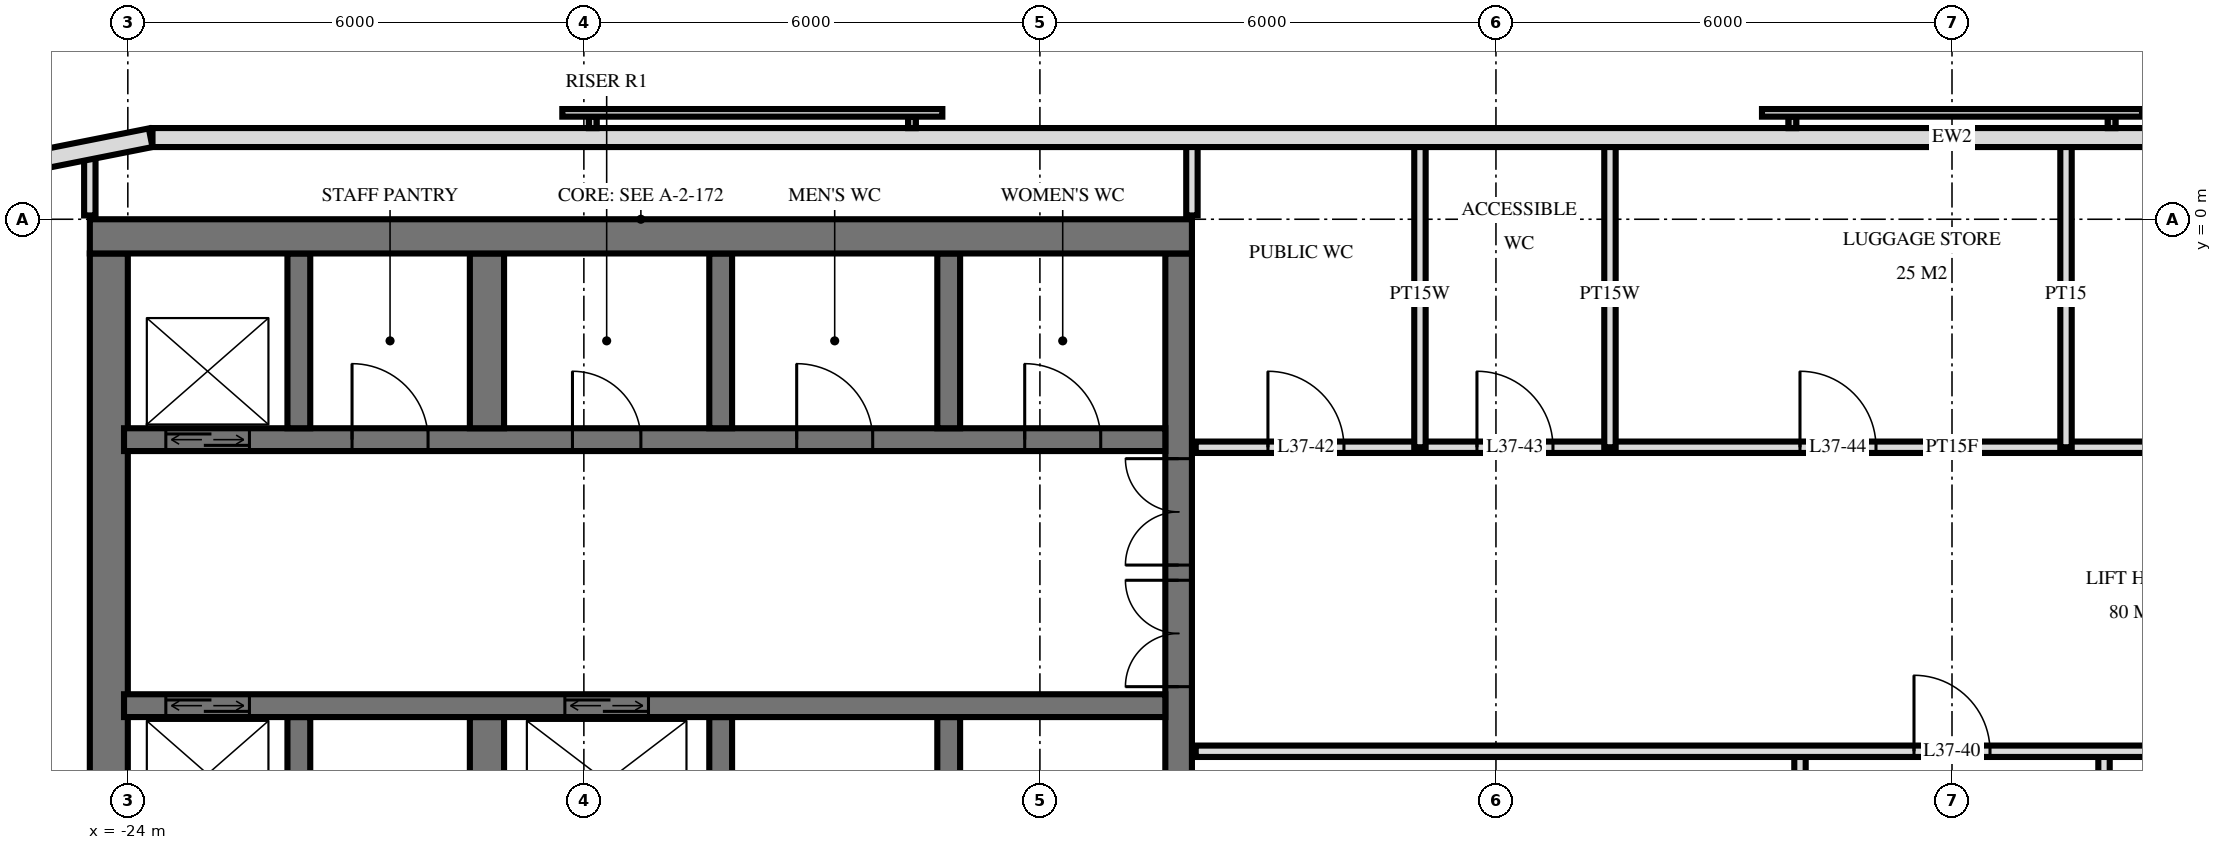
"""IFC4 building model, lengths in metres.
Left out: names, types, materials, properties, quantities, classifications, styles, units other than length and angle.
Written with IfcOpenShell. Run it as: python <this file> out.ifc"""

import sys

from ifc_helpers import new_model, si_unit, direction, frame, frame_2d, origin, place, context, subcontext, project, spatial, rectangle, extrude, element, fill, save


model = new_model("IFC4")
c1 = context("Model", 3, precision=1e-05, world=origin(), true_north=direction((0.0, 1.0)))
c2 = subcontext(c1, "Body", "Model", "MODEL_VIEW")
j1 = project(units=[si_unit("LENGTHUNIT", "METRE"), si_unit("PLANEANGLEUNIT", "RADIAN")], contexts=[c1])
p1 = place(None, origin())
s1 = spatial("IfcSite", under=j1, at=p1, CompositionType="ELEMENT")
p2 = place(p1, origin())
s2 = spatial("IfcBuilding", under=s1, at=p2, CompositionType="ELEMENT")
p3 = place(p2, frame((0.0, 0.0, 145.2)))
s3 = spatial("IfcBuildingStorey", under=s2, at=p3, CompositionType="ELEMENT", Elevation=145.2)
p4 = place(p3, frame((-24.5, -0.225, 0.0), z_axis=(0.0, 0.0, 1.0), x_axis=(1.0, 0.0, 0.0)))
e1 = element("IfcWall", 1, at=p4, inside=s3, PredefinedType="SHEAR", context=c2, shape_type="SweptSolid", body=[
    extrude(rectangle(XDim=14.5, YDim=0.45, at=frame_2d((7.25, 0.0))), origin(), (0.0, 0.0, 1.0), 3.6),
])
p5 = place(p3, frame((-10.175, -14.55, 0.0), z_axis=(0.0, 0.0, 1.0), x_axis=(0.0, 1.0, 0.0)))
e2 = element("IfcWall", 2, at=p5, inside=s3, PredefinedType="SHEAR", context=c2, shape_type="SweptSolid", body=[
    extrude(rectangle(XDim=14.1, YDim=0.35, at=frame_2d((7.05, 0.0))), origin(), (0.0, 0.0, 1.0), 3.6),
])
p6 = place(p5, frame((8.4, 0.0, 0.0)))
e3 = element("IfcOpeningElement", 3, at=p6, cuts=e2, PredefinedType="OPENING", context=c2, shape_type="SweptSolid", body=[
    extrude(rectangle(XDim=1.4, YDim=2.4, at=frame_2d((0.7, 1.2))), frame((0.0, 0.185, 0.0), z_axis=(0.0, -1.0, 0.0), x_axis=(1.0, 0.0, 0.0)), (0.0, 0.0, 1.0), 0.37),
])
p7 = place(p5, frame((10.0, 0.0, 0.0)))
e4 = element("IfcOpeningElement", 4, at=p7, cuts=e2, PredefinedType="OPENING", context=c2, shape_type="SweptSolid", body=[
    extrude(rectangle(XDim=1.4, YDim=2.4, at=frame_2d((0.7, 1.2))), frame((0.0, 0.185, 0.0), z_axis=(0.0, -1.0, 0.0), x_axis=(1.0, 0.0, 0.0)), (0.0, 0.0, 1.0), 0.37),
])
p8 = place(p5, frame((4.0, 0.0, 0.0)))
e5 = element("IfcOpeningElement", 5, at=p8, cuts=e2, PredefinedType="OPENING", context=c2, shape_type="SweptSolid", body=[
    extrude(rectangle(XDim=1.2, YDim=2.1, at=frame_2d((0.6, 1.05))), frame((0.0, 0.185, 0.0), z_axis=(0.0, -1.0, 0.0), x_axis=(1.0, 0.0, 0.0)), (0.0, 0.0, 1.0), 0.37),
])
p9 = place(p3, frame((-24.25, -14.55, 0.0), z_axis=(0.0, 0.0, 1.0), x_axis=(0.0, 1.0, 0.0)))
e6 = element("IfcWall", 6, at=p9, inside=s3, PredefinedType="SHEAR", context=c2, shape_type="SweptSolid", body=[
    extrude(rectangle(XDim=14.1, YDim=0.5, at=frame_2d((7.05, 0.0))), origin(), (0.0, 0.0, 1.0), 3.6),
])
p10 = place(p3, frame((-24.05, -2.9, 0.0), z_axis=(0.0, 0.0, 1.0), x_axis=(1.0, 0.0, 0.0)))
e7 = element("IfcWall", 7, at=p10, inside=s3, PredefinedType="SHEAR", context=c2, shape_type="SweptSolid", body=[
    extrude(rectangle(XDim=13.7, YDim=0.3, at=frame_2d((6.85, 0.0))), origin(), (0.0, 0.0, 1.0), 3.6),
])
p11 = place(p10, frame((0.55, 0.0, 0.0)))
e8 = element("IfcOpeningElement", 8, at=p11, cuts=e7, PredefinedType="OPENING", context=c2, shape_type="SweptSolid", body=[
    extrude(rectangle(XDim=1.1, YDim=2.1, at=frame_2d((0.55, 1.05))), frame((0.0, 0.16, 0.0), z_axis=(0.0, -1.0, 0.0), x_axis=(1.0, 0.0, 0.0)), (0.0, 0.0, 1.0), 0.32),
])
p12 = place(p10, frame((5.9, 0.0, 0.0)))
e9 = element("IfcOpeningElement", 9, at=p12, cuts=e7, PredefinedType="OPENING", context=c2, shape_type="SweptSolid", body=[
    extrude(rectangle(XDim=0.9, YDim=2.1, at=frame_2d((0.45, 1.05))), frame((0.0, 0.16, 0.0), z_axis=(0.0, -1.0, 0.0), x_axis=(1.0, 0.0, 0.0)), (0.0, 0.0, 1.0), 0.32),
])
p13 = place(p10, frame((11.85, 0.0, 0.0)))
e10 = element("IfcOpeningElement", 10, at=p13, cuts=e7, PredefinedType="OPENING", context=c2, shape_type="SweptSolid", body=[
    extrude(rectangle(XDim=1.0, YDim=2.1, at=frame_2d((0.5, 1.05))), frame((0.0, 0.16, 0.0), z_axis=(0.0, -1.0, 0.0), x_axis=(1.0, 0.0, 0.0)), (0.0, 0.0, 1.0), 0.32),
])
p14 = place(p10, frame((8.85, 0.0, 0.0)))
e11 = element("IfcOpeningElement", 11, at=p14, cuts=e7, PredefinedType="OPENING", context=c2, shape_type="SweptSolid", body=[
    extrude(rectangle(XDim=1.0, YDim=2.1, at=frame_2d((0.5, 1.05))), frame((0.0, 0.16, 0.0), z_axis=(0.0, -1.0, 0.0), x_axis=(1.0, 0.0, 0.0)), (0.0, 0.0, 1.0), 0.32),
])
p15 = place(p10, frame((3.0, 0.0, 0.0)))
e12 = element("IfcOpeningElement", 12, at=p15, cuts=e7, PredefinedType="OPENING", context=c2, shape_type="SweptSolid", body=[
    extrude(rectangle(XDim=1.0, YDim=2.1, at=frame_2d((0.5, 1.05))), frame((0.0, 0.16, 0.0), z_axis=(0.0, -1.0, 0.0), x_axis=(1.0, 0.0, 0.0)), (0.0, 0.0, 1.0), 0.32),
])
p16 = place(p3, frame((-24.05, -6.4, 0.0), z_axis=(0.0, 0.0, 1.0), x_axis=(1.0, 0.0, 0.0)))
e13 = element("IfcWall", 13, at=p16, inside=s3, PredefinedType="SHEAR", context=c2, shape_type="SweptSolid", body=[
    extrude(rectangle(XDim=13.7, YDim=0.3, at=frame_2d((6.85, 0.0))), origin(), (0.0, 0.0, 1.0), 3.6),
])
p17 = place(p16, frame((0.55, 0.0, 0.0)))
e14 = element("IfcOpeningElement", 14, at=p17, cuts=e13, PredefinedType="OPENING", context=c2, shape_type="SweptSolid", body=[
    extrude(rectangle(XDim=1.1, YDim=2.1, at=frame_2d((0.55, 1.05))), frame((0.0, 0.16, 0.0), z_axis=(0.0, -1.0, 0.0), x_axis=(1.0, 0.0, 0.0)), (0.0, 0.0, 1.0), 0.32),
])
p18 = place(p16, frame((5.8, 0.0, 0.0)))
e15 = element("IfcOpeningElement", 15, at=p18, cuts=e13, PredefinedType="OPENING", context=c2, shape_type="SweptSolid", body=[
    extrude(rectangle(XDim=1.1, YDim=2.1, at=frame_2d((0.55, 1.05))), frame((0.0, 0.16, 0.0), z_axis=(0.0, -1.0, 0.0), x_axis=(1.0, 0.0, 0.0)), (0.0, 0.0, 1.0), 0.32),
])
for number, where, z_axis, x_axis in (
    (16, (-13.2, -2.75, 0.0), (0.0, 0.0, 1.0), (0.0, 1.0, 0.0)),
    (17, (-13.2, -8.85, 0.0), (0.0, 0.0, 1.0), (0.0, 1.0, 0.0)),
    (18, (-16.2, -2.75, 0.0), (0.0, 0.0, 1.0), (0.0, 1.0, 0.0)),
    (19, (-16.2, -8.85, 0.0), (0.0, 0.0, 1.0), (0.0, 1.0, 0.0)),
):
    element("IfcWall", number, at=place(p3, frame(where, z_axis=z_axis, x_axis=x_axis)), inside=s3, PredefinedType="SHEAR", context=c2, shape_type="SweptSolid", body=[
        extrude(rectangle(XDim=2.3, YDim=0.3, at=frame_2d((1.15, 0.0))), origin(), (0.0, 0.0, 1.0), 3.6),
    ])
for number, where, z_axis, x_axis in (
    (20, (-19.275, -2.75, 0.0), (0.0, 0.0, 1.0), (0.0, 1.0, 0.0)),
    (21, (-19.275, -8.85, 0.0), (0.0, 0.0, 1.0), (0.0, 1.0, 0.0)),
):
    element("IfcWall", number, at=place(p3, frame(where, z_axis=z_axis, x_axis=x_axis)), inside=s3, PredefinedType="SHEAR", context=c2, shape_type="SweptSolid", body=[
        extrude(rectangle(XDim=2.3, YDim=0.45, at=frame_2d((1.15, 0.0))), origin(), (0.0, 0.0, 1.0), 3.6),
    ])
for number, where, z_axis, x_axis in (
    (22, (-21.75, -2.75, 0.0), (0.0, 0.0, 1.0), (0.0, 1.0, 0.0)),
    (23, (-21.75, -8.85, 0.0), (0.0, 0.0, 1.0), (0.0, 1.0, 0.0)),
):
    element("IfcWall", number, at=place(p3, frame(where, z_axis=z_axis, x_axis=x_axis)), inside=s3, PredefinedType="SHEAR", context=c2, shape_type="SweptSolid", body=[
        extrude(rectangle(XDim=2.3, YDim=0.3, at=frame_2d((1.15, 0.0))), origin(), (0.0, 0.0, 1.0), 3.6),
    ])
p19 = place(p3, frame((23.675, 1.075, 0.0), z_axis=(0.0, 0.0, 1.0), x_axis=(-1.0, 0.0, 0.0)))
e24 = element("IfcWall", 24, at=p19, inside=s3, PredefinedType="SOLIDWALL", context=c2, shape_type="SweptSolid", body=[
    extrude(rectangle(XDim=47.351, YDim=0.25, at=frame_2d((23.675, 0.0))), origin(), (0.0, 0.0, 1.0), 3.32),
])
p20 = place(p3, frame((-23.7, 1.073, 0.0), z_axis=(0.0, 0.0, 1.0), x_axis=(-0.980803419081, -0.194999110559, 0.0)))
e25 = element("IfcWall", 25, at=p20, inside=s3, PredefinedType="SOLIDWALL", context=c2, shape_type="SweptSolid", body=[
    extrude(rectangle(XDim=1.681, YDim=0.25, at=frame_2d((0.841, 0.0))), origin(), (0.0, 0.0, 1.0), 3.32),
])
p21 = place(p3, frame((2.0, -11.0, 0.0), z_axis=(0.0, 0.0, 1.0), x_axis=(0.0, 1.0, 0.0)))
e26 = element("IfcWall", 26, at=p21, inside=s3, PredefinedType="PARTITIONING", context=c2, shape_type="SweptSolid", body=[
    extrude(rectangle(XDim=4.0, YDim=0.15, at=frame_2d((2.0, 0.0))), origin(), (0.0, 0.0, 1.0), 3.32),
])
p22 = place(p3, frame((1.5, -3.0, 0.0), z_axis=(0.0, 0.0, 1.0), x_axis=(0.0, 1.0, 0.0)))
e27 = element("IfcWall", 27, at=p22, inside=s3, PredefinedType="PARTITIONING", context=c2, shape_type="SweptSolid", body=[
    extrude(rectangle(XDim=4.02, YDim=0.15, at=frame_2d((2.01, 0.0))), origin(), (0.0, 0.0, 1.0), 3.32),
])
p23 = place(p3, frame((-2.0, -11.0, 0.0), z_axis=(0.0, 0.0, 1.0), x_axis=(0.0, 1.0, 0.0)))
e28 = element("IfcWall", 28, at=p23, inside=s3, PredefinedType="PARTITIONING", context=c2, shape_type="SweptSolid", body=[
    extrude(rectangle(XDim=4.0, YDim=0.15, at=frame_2d((2.0, 0.0))), origin(), (0.0, 0.0, 1.0), 3.32),
])
for number, where, z_axis, x_axis in (
    (29, (-4.5, -3.0, 0.0), (0.0, 0.0, 1.0), (0.0, 1.0, 0.0)),
    (30, (-7.0, -3.0, 0.0), (0.0, 0.0, 1.0), (0.0, 1.0, 0.0)),
):
    element("IfcWall", number, at=place(p3, frame(where, z_axis=z_axis, x_axis=x_axis)), inside=s3, PredefinedType="PLUMBINGWALL", context=c2, shape_type="SweptSolid", body=[
        extrude(rectangle(XDim=4.02, YDim=0.15, at=frame_2d((2.01, 0.0))), origin(), (0.0, 0.0, 1.0), 3.32),
    ])
p24 = place(p3, frame((-10.0, 0.05, 0.0), z_axis=(0.0, 0.0, 1.0), x_axis=(0.0, 1.0, 0.0)))
e31 = element("IfcWall", 31, at=p24, inside=s3, PredefinedType="PLUMBINGWALL", context=c2, shape_type="SweptSolid", body=[
    extrude(rectangle(XDim=0.97, YDim=0.15, at=frame_2d((0.485, 0.0))), origin(), (0.0, 0.0, 1.0), 3.32),
])
p25 = place(p3, frame((-24.5, 0.05, 0.0), z_axis=(0.0, 0.0, 1.0), x_axis=(0.0, 1.0, 0.0)))
e32 = element("IfcWall", 32, at=p25, inside=s3, PredefinedType="PARTITIONING", context=c2, shape_type="SweptSolid", body=[
    extrude(rectangle(XDim=0.807, YDim=0.15, at=frame_2d((0.404, 0.0))), origin(), (0.0, 0.0, 1.0), 3.32),
])
p26 = place(p3, frame((-9.95, -7.0, 0.0), z_axis=(0.0, 0.0, 1.0), x_axis=(1.0, 0.0, 0.0)))
e33 = element("IfcWall", 33, at=p26, inside=s3, PredefinedType="PARTITIONING", context=c2, shape_type="SweptSolid", body=[
    extrude(rectangle(XDim=19.9, YDim=0.15, at=frame_2d((9.95, 0.0))), origin(), (0.0, 0.0, 1.0), 3.32),
])
p27 = place(p26, frame((9.45, 0.0, 0.0)))
e34 = element("IfcOpeningElement", 34, at=p27, cuts=e33, PredefinedType="OPENING", context=c2, shape_type="SweptSolid", body=[
    extrude(rectangle(XDim=1.0, YDim=2.1, at=frame_2d((0.5, 1.05))), frame((0.0, 0.085, 0.0), z_axis=(0.0, -1.0, 0.0), x_axis=(1.0, 0.0, 0.0)), (0.0, 0.0, 1.0), 0.17),
])
p28 = place(p26, frame((15.45, 0.0, 0.0)))
e35 = element("IfcOpeningElement", 35, at=p28, cuts=e33, PredefinedType="OPENING", context=c2, shape_type="SweptSolid", body=[
    extrude(rectangle(XDim=1.0, YDim=2.1, at=frame_2d((0.5, 1.05))), frame((0.0, 0.085, 0.0), z_axis=(0.0, -1.0, 0.0), x_axis=(1.0, 0.0, 0.0)), (0.0, 0.0, 1.0), 0.17),
])
p29 = place(p3, frame((-9.95, -3.0, 0.0), z_axis=(0.0, 0.0, 1.0), x_axis=(1.0, 0.0, 0.0)))
e36 = element("IfcWall", 36, at=p29, inside=s3, PredefinedType="PARTITIONING", context=c2, shape_type="SweptSolid", body=[
    extrude(rectangle(XDim=19.9, YDim=0.15, at=frame_2d((9.95, 0.0))), origin(), (0.0, 0.0, 1.0), 3.32),
])
p30 = place(p29, frame((0.95, 0.0, 0.0)))
e37 = element("IfcOpeningElement", 37, at=p30, cuts=e36, PredefinedType="OPENING", context=c2, shape_type="SweptSolid", body=[
    extrude(rectangle(XDim=1.0, YDim=2.1, at=frame_2d((0.5, 1.05))), frame((0.0, 0.085, 0.0), z_axis=(0.0, -1.0, 0.0), x_axis=(1.0, 0.0, 0.0)), (0.0, 0.0, 1.0), 0.17),
])
p31 = place(p29, frame((3.7, 0.0, 0.0)))
e38 = element("IfcOpeningElement", 38, at=p31, cuts=e36, PredefinedType="OPENING", context=c2, shape_type="SweptSolid", body=[
    extrude(rectangle(XDim=1.0, YDim=2.1, at=frame_2d((0.5, 1.05))), frame((0.0, 0.085, 0.0), z_axis=(0.0, -1.0, 0.0), x_axis=(1.0, 0.0, 0.0)), (0.0, 0.0, 1.0), 0.17),
])
p32 = place(p29, frame((7.95, 0.0, 0.0)))
e39 = element("IfcOpeningElement", 39, at=p32, cuts=e36, PredefinedType="OPENING", context=c2, shape_type="SweptSolid", body=[
    extrude(rectangle(XDim=1.0, YDim=2.1, at=frame_2d((0.5, 1.05))), frame((0.0, 0.085, 0.0), z_axis=(0.0, -1.0, 0.0), x_axis=(1.0, 0.0, 0.0)), (0.0, 0.0, 1.0), 0.17),
])
p33 = place(p29, frame((15.2, 0.0, 0.0)))
e40 = element("IfcOpeningElement", 40, at=p33, cuts=e36, PredefinedType="OPENING", context=c2, shape_type="SweptSolid", body=[
    extrude(rectangle(XDim=1.0, YDim=2.1, at=frame_2d((0.5, 1.05))), frame((0.0, 0.085, 0.0), z_axis=(0.0, -1.0, 0.0), x_axis=(1.0, 0.0, 0.0)), (0.0, 0.0, 1.0), 0.17),
])
p34 = place(p11, origin())
e41 = element("IfcDoor", 41, at=p34, inside=s3, OperationType="DOUBLE_DOOR_SLIDING", PredefinedType="USERDEFINED", context=c2, shape_type="SweptSolid", body=[
    extrude(rectangle(XDim=1.1, YDim=2.1, at=frame_2d((0.55, 1.05))), frame((0.0, 0.025, 0.0), z_axis=(0.0, -1.0, 0.0), x_axis=(1.0, 0.0, 0.0)), (0.0, 0.0, 1.0), 0.05),
])
fill(e8, e41)
p35 = place(p17, origin())
e42 = element("IfcDoor", 42, at=p35, inside=s3, OperationType="DOUBLE_DOOR_SLIDING", PredefinedType="USERDEFINED", context=c2, shape_type="SweptSolid", body=[
    extrude(rectangle(XDim=1.1, YDim=2.1, at=frame_2d((0.55, 1.05))), frame((0.0, 0.025, 0.0), z_axis=(0.0, -1.0, 0.0), x_axis=(1.0, 0.0, 0.0)), (0.0, 0.0, 1.0), 0.05),
])
fill(e14, e42)
p36 = place(p18, origin())
e43 = element("IfcDoor", 43, at=p36, inside=s3, OperationType="DOUBLE_DOOR_SLIDING", PredefinedType="USERDEFINED", context=c2, shape_type="SweptSolid", body=[
    extrude(rectangle(XDim=1.1, YDim=2.1, at=frame_2d((0.55, 1.05))), frame((0.0, 0.025, 0.0), z_axis=(0.0, -1.0, 0.0), x_axis=(1.0, 0.0, 0.0)), (0.0, 0.0, 1.0), 0.05),
])
fill(e15, e43)
p37 = place(p6, origin())
e44 = element("IfcDoor", 44, at=p37, inside=s3, OperationType="DOUBLE_DOOR_SINGLE_SWING", PredefinedType="DOOR", context=c2, shape_type="SweptSolid", body=[
    extrude(rectangle(XDim=1.4, YDim=2.4, at=frame_2d((0.7, 1.2))), frame((0.0, 0.025, 0.0), z_axis=(0.0, -1.0, 0.0), x_axis=(1.0, 0.0, 0.0)), (0.0, 0.0, 1.0), 0.05),
])
fill(e3, e44)
p38 = place(p7, origin())
e45 = element("IfcDoor", 45, at=p38, inside=s3, OperationType="DOUBLE_DOOR_SINGLE_SWING", PredefinedType="DOOR", context=c2, shape_type="SweptSolid", body=[
    extrude(rectangle(XDim=1.4, YDim=2.4, at=frame_2d((0.7, 1.2))), frame((0.0, 0.025, 0.0), z_axis=(0.0, -1.0, 0.0), x_axis=(1.0, 0.0, 0.0)), (0.0, 0.0, 1.0), 0.05),
])
fill(e4, e45)
p39 = place(p12, origin())
e46 = element("IfcDoor", 46, at=p39, inside=s3, OperationType="SINGLE_SWING_RIGHT", PredefinedType="DOOR", context=c2, shape_type="SweptSolid", body=[
    extrude(rectangle(XDim=0.9, YDim=2.1, at=frame_2d((0.45, 1.05))), frame((0.0, 0.025, 0.0), z_axis=(0.0, -1.0, 0.0), x_axis=(1.0, 0.0, 0.0)), (0.0, 0.0, 1.0), 0.05),
])
fill(e9, e46)
p40 = place(p13, origin())
e47 = element("IfcDoor", 47, at=p40, inside=s3, OperationType="SINGLE_SWING_RIGHT", PredefinedType="DOOR", context=c2, shape_type="SweptSolid", body=[
    extrude(rectangle(XDim=1.0, YDim=2.1, at=frame_2d((0.5, 1.05))), frame((0.0, 0.025, 0.0), z_axis=(0.0, -1.0, 0.0), x_axis=(1.0, 0.0, 0.0)), (0.0, 0.0, 1.0), 0.05),
])
fill(e10, e47)
p41 = place(p14, origin())
e48 = element("IfcDoor", 48, at=p41, inside=s3, OperationType="SINGLE_SWING_RIGHT", PredefinedType="DOOR", context=c2, shape_type="SweptSolid", body=[
    extrude(rectangle(XDim=1.0, YDim=2.1, at=frame_2d((0.5, 1.05))), frame((0.0, 0.025, 0.0), z_axis=(0.0, -1.0, 0.0), x_axis=(1.0, 0.0, 0.0)), (0.0, 0.0, 1.0), 0.05),
])
fill(e11, e48)
p42 = place(p15, origin())
e49 = element("IfcDoor", 49, at=p42, inside=s3, OperationType="SINGLE_SWING_RIGHT", PredefinedType="DOOR", context=c2, shape_type="SweptSolid", body=[
    extrude(rectangle(XDim=1.0, YDim=2.1, at=frame_2d((0.5, 1.05))), frame((0.0, 0.025, 0.0), z_axis=(0.0, -1.0, 0.0), x_axis=(1.0, 0.0, 0.0)), (0.0, 0.0, 1.0), 0.05),
])
fill(e12, e49)
p43 = place(p27, origin())
e50 = element("IfcDoor", 50, at=p43, inside=s3, OperationType="SINGLE_SWING_RIGHT", PredefinedType="DOOR", context=c2, shape_type="SweptSolid", body=[
    extrude(rectangle(XDim=1.0, YDim=2.1, at=frame_2d((0.5, 1.05))), frame((0.0, 0.025, 0.0), z_axis=(0.0, -1.0, 0.0), x_axis=(1.0, 0.0, 0.0)), (0.0, 0.0, 1.0), 0.05),
])
fill(e34, e50)
p44 = place(p30, origin())
e51 = element("IfcDoor", 51, at=p44, inside=s3, OperationType="SINGLE_SWING_RIGHT", PredefinedType="DOOR", context=c2, shape_type="SweptSolid", body=[
    extrude(rectangle(XDim=1.0, YDim=2.1, at=frame_2d((0.5, 1.05))), frame((0.0, 0.025, 0.0), z_axis=(0.0, -1.0, 0.0), x_axis=(1.0, 0.0, 0.0)), (0.0, 0.0, 1.0), 0.05),
])
fill(e37, e51)
p45 = place(p31, origin())
e52 = element("IfcDoor", 52, at=p45, inside=s3, OperationType="SINGLE_SWING_RIGHT", PredefinedType="DOOR", context=c2, shape_type="SweptSolid", body=[
    extrude(rectangle(XDim=1.0, YDim=2.1, at=frame_2d((0.5, 1.05))), frame((0.0, 0.025, 0.0), z_axis=(0.0, -1.0, 0.0), x_axis=(1.0, 0.0, 0.0)), (0.0, 0.0, 1.0), 0.05),
])
fill(e38, e52)
p46 = place(p32, origin())
e53 = element("IfcDoor", 53, at=p46, inside=s3, OperationType="SINGLE_SWING_RIGHT", PredefinedType="DOOR", context=c2, shape_type="SweptSolid", body=[
    extrude(rectangle(XDim=1.0, YDim=2.1, at=frame_2d((0.5, 1.05))), frame((0.0, 0.025, 0.0), z_axis=(0.0, -1.0, 0.0), x_axis=(1.0, 0.0, 0.0)), (0.0, 0.0, 1.0), 0.05),
])
fill(e39, e53)
save(model, sys.argv[1])
